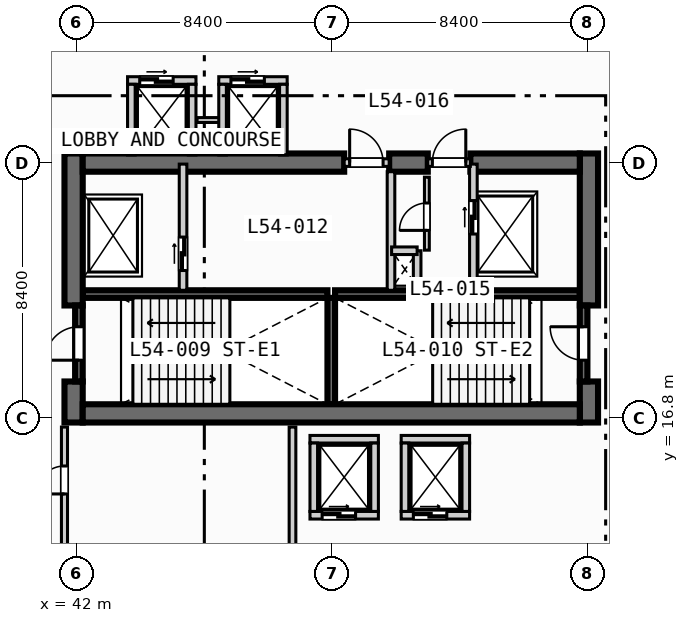
"""IFC4 building model, lengths in metres.
Left out: names, types, materials, properties, quantities, classifications, styles, units other than length and angle.
Written with IfcOpenShell. Run it as: python <this file> out.ifc"""

import sys

from ifc_helpers import new_model, si_unit, direction, frame, frame_2d, origin, place, context, subcontext, project, spatial, rectangle, extrude, element, fill, save


model = new_model("IFC4")
c1 = context("Model", 3, precision=1e-05, world=origin(), true_north=direction((0.0, 1.0)))
c2 = subcontext(c1, "Body", "Model", "MODEL_VIEW")
j1 = project(units=[si_unit("LENGTHUNIT", "METRE"), si_unit("PLANEANGLEUNIT", "RADIAN")], contexts=[c1])
p1 = place(None, origin())
s1 = spatial("IfcSite", under=j1, at=p1, CompositionType="ELEMENT")
p2 = place(p1, origin())
s2 = spatial("IfcBuilding", under=s1, at=p2, CompositionType="ELEMENT")
p3 = place(p2, frame((0.0, 0.0, 219.8)))
s3 = spatial("IfcBuildingStorey", under=s2, at=p3, CompositionType="ELEMENT", Elevation=219.8)
for number, where, z_axis, x_axis in (
    (1, (42.2, 20.875, 0.0), (0.0, 0.0, 1.0), (1.0, 0.0, 0.0)),
    (2, (50.5, 20.875, 0.0), (0.0, 0.0, 1.0), (1.0, 0.0, 0.0)),
):
    element("IfcWall", number, at=place(p3, frame(where, z_axis=z_axis, x_axis=x_axis)), inside=s3, PredefinedType="SOLIDWALL", context=c2, shape_type="SweptSolid", body=[
        extrude(rectangle(XDim=8.05, YDim=0.25, at=frame_2d((4.025, 0.0))), origin(), (0.0, 0.0, 1.0), 3.97),
    ])
p4 = place(p3, frame((50.375, 17.25, 0.0), z_axis=(0.0, 0.0, 1.0), x_axis=(0.0, 1.0, 0.0)))
e3 = element("IfcWall", 3, at=p4, inside=s3, PredefinedType="SOLIDWALL", context=c2, shape_type="SweptSolid", body=[
    extrude(rectangle(XDim=3.5, YDim=0.25, at=frame_2d((1.75, 0.0))), origin(), (0.0, 0.0, 1.0), 3.97),
])
p5 = place(p3, frame((41.9, 16.65, 0.0), z_axis=(0.0, 0.0, 1.0), x_axis=(0.0, 1.0, 0.0)))
e4 = element("IfcWall", 4, at=p5, inside=s3, PredefinedType="SHEAR", context=c2, shape_type="SweptSolid", body=[
    extrude(rectangle(XDim=1.35, YDim=0.6, at=frame_2d((0.675, 0.0))), origin(), (0.0, 0.0, 1.0), 3.97),
])
p6 = place(p3, frame((41.9, 20.5, 0.0), z_axis=(0.0, 0.0, 1.0), x_axis=(0.0, 1.0, 0.0)))
e5 = element("IfcWall", 5, at=p6, inside=s3, PredefinedType="SHEAR", context=c2, shape_type="SweptSolid", body=[
    extrude(rectangle(XDim=5.0, YDim=0.6, at=frame_2d((2.5, 0.0))), origin(), (0.0, 0.0, 1.0), 3.97),
])
p7 = place(p3, frame((58.85, 16.65, 0.0), z_axis=(0.0, 0.0, 1.0), x_axis=(0.0, 1.0, 0.0)))
e6 = element("IfcWall", 6, at=p7, inside=s3, PredefinedType="SHEAR", context=c2, shape_type="SweptSolid", body=[
    extrude(rectangle(XDim=1.35, YDim=0.6, at=frame_2d((0.675, 0.0))), origin(), (0.0, 0.0, 1.0), 3.97),
])
p8 = place(p3, frame((58.85, 20.5, 0.0), z_axis=(0.0, 0.0, 1.0), x_axis=(0.0, 1.0, 0.0)))
e7 = element("IfcWall", 7, at=p8, inside=s3, PredefinedType="SHEAR", context=c2, shape_type="SweptSolid", body=[
    extrude(rectangle(XDim=5.0, YDim=0.6, at=frame_2d((2.5, 0.0))), origin(), (0.0, 0.0, 1.0), 3.97),
])
p9 = place(p3, frame((42.2, 16.95, 0.0), z_axis=(0.0, 0.0, 1.0), x_axis=(1.0, 0.0, 0.0)))
e8 = element("IfcWall", 8, at=p9, inside=s3, PredefinedType="SHEAR", context=c2, shape_type="SweptSolid", body=[
    extrude(rectangle(XDim=16.35, YDim=0.6, at=frame_2d((8.175, 0.0))), origin(), (0.0, 0.0, 1.0), 3.97),
])
p10 = place(p3, frame((42.2, 25.2, 0.0), z_axis=(0.0, 0.0, 1.0), x_axis=(1.0, 0.0, 0.0)))
e9 = element("IfcWall", 9, at=p10, inside=s3, PredefinedType="SHEAR", context=c2, shape_type="SweptSolid", body=[
    extrude(rectangle(XDim=8.6, YDim=0.6, at=frame_2d((4.3, 0.0))), origin(), (0.0, 0.0, 1.0), 3.97),
])
p11 = place(p3, frame((52.28, 25.2, 0.0), z_axis=(0.0, 0.0, 1.0), x_axis=(1.0, 0.0, 0.0)))
e10 = element("IfcWall", 10, at=p11, inside=s3, PredefinedType="SHEAR", context=c2, shape_type="SweptSolid", body=[
    extrude(rectangle(XDim=1.27, YDim=0.6, at=frame_2d((0.635, 0.0))), origin(), (0.0, 0.0, 1.0), 3.97),
])
p12 = place(p3, frame((54.95, 25.2, 0.0), z_axis=(0.0, 0.0, 1.0), x_axis=(1.0, 0.0, 0.0)))
e11 = element("IfcWall", 11, at=p12, inside=s3, PredefinedType="SHEAR", context=c2, shape_type="SweptSolid", body=[
    extrude(rectangle(XDim=3.6, YDim=0.6, at=frame_2d((1.8, 0.0))), origin(), (0.0, 0.0, 1.0), 3.97),
])
p13 = place(p3, frame((42.075, 18.0, 0.0), z_axis=(0.0, 0.0, 1.0), x_axis=(0.0, 1.0, 0.0)))
e12 = element("IfcWall", 12, at=p13, inside=s3, PredefinedType="SOLIDWALL", context=c2, shape_type="SweptSolid", body=[
    extrude(rectangle(XDim=2.5, YDim=0.25, at=frame_2d((1.25, 0.0))), origin(), (0.0, 0.0, 1.0), 3.97),
])
p14 = place(p13, frame((0.7, 0.0, 0.0)))
e13 = element("IfcOpeningElement", 13, at=p14, cuts=e12, PredefinedType="OPENING", context=c2, shape_type="SweptSolid", body=[
    extrude(rectangle(XDim=1.1, YDim=2.15, at=frame_2d((0.55, 1.075))), frame((0.0, 0.135, 0.0), z_axis=(0.0, -1.0, 0.0), x_axis=(1.0, 0.0, 0.0)), (0.0, 0.0, 1.0), 0.27),
])
p15 = place(p3, frame((58.675, 18.0, 0.0), z_axis=(0.0, 0.0, 1.0), x_axis=(0.0, 1.0, 0.0)))
e14 = element("IfcWall", 14, at=p15, inside=s3, PredefinedType="SOLIDWALL", context=c2, shape_type="SweptSolid", body=[
    extrude(rectangle(XDim=2.5, YDim=0.25, at=frame_2d((1.25, 0.0))), origin(), (0.0, 0.0, 1.0), 3.97),
])
p16 = place(p15, frame((0.7, 0.0, 0.0)))
e15 = element("IfcOpeningElement", 15, at=p16, cuts=e14, PredefinedType="OPENING", context=c2, shape_type="SweptSolid", body=[
    extrude(rectangle(XDim=1.1, YDim=2.15, at=frame_2d((0.55, 1.075))), frame((0.0, 0.135, 0.0), z_axis=(0.0, -1.0, 0.0), x_axis=(1.0, 0.0, 0.0)), (0.0, 0.0, 1.0), 0.27),
])
p17 = place(p3, frame((45.5, 21.0, 0.0), z_axis=(0.0, 0.0, 1.0), x_axis=(0.0, 1.0, 0.0)))
e16 = element("IfcWall", 16, at=p17, inside=s3, PredefinedType="SOLIDWALL", context=c2, shape_type="SweptSolid", body=[
    extrude(rectangle(XDim=4.15, YDim=0.25, at=frame_2d((2.075, 0.0))), origin(), (0.0, 0.0, 1.0), 3.97),
])
p18 = place(p17, frame((0.65, 0.0, 0.0)))
e17 = element("IfcOpeningElement", 17, at=p18, cuts=e16, PredefinedType="OPENING", context=c2, shape_type="SweptSolid", body=[
    extrude(rectangle(XDim=1.1, YDim=2.15, at=frame_2d((0.55, 1.075))), frame((0.0, 0.135, 0.0), z_axis=(0.0, -1.0, 0.0), x_axis=(1.0, 0.0, 0.0)), (0.0, 0.0, 1.0), 0.27),
])
p19 = place(p3, frame((50.8, 25.2, 0.0), z_axis=(0.0, 0.0, 1.0), x_axis=(1.0, 0.0, 0.0)))
e18 = element("IfcWall", 18, at=p19, inside=s3, PredefinedType="SOLIDWALL", context=c2, shape_type="SweptSolid", body=[
    extrude(rectangle(XDim=1.48, YDim=0.25, at=frame_2d((0.74, 0.0))), origin(), (0.0, 0.0, 1.0), 3.97),
])
p20 = place(p19, frame((0.18, 0.0, 0.0)))
e19 = element("IfcOpeningElement", 19, at=p20, cuts=e18, PredefinedType="OPENING", context=c2, shape_type="SweptSolid", body=[
    extrude(rectangle(XDim=1.1, YDim=2.15, at=frame_2d((0.55, 1.075))), frame((0.0, 0.135, 0.0), z_axis=(0.0, -1.0, 0.0), x_axis=(1.0, 0.0, 0.0)), (0.0, 0.0, 1.0), 0.27),
])
p21 = place(p3, frame((52.34, 21.0, 0.0), z_axis=(0.0, 0.0, 1.0), x_axis=(0.0, 1.0, 0.0)))
e20 = element("IfcWall", 20, at=p21, inside=s3, PredefinedType="SOLIDWALL", context=c2, shape_type="SweptSolid", body=[
    extrude(rectangle(XDim=3.9, YDim=0.25, at=frame_2d((1.95, 0.0))), origin(), (0.0, 0.0, 1.0), 3.97),
])
p22 = place(p3, frame((55.05, 21.0, 0.0), z_axis=(0.0, 0.0, 1.0), x_axis=(0.0, 1.0, 0.0)))
e21 = element("IfcWall", 21, at=p22, inside=s3, PredefinedType="SOLIDWALL", context=c2, shape_type="SweptSolid", body=[
    extrude(rectangle(XDim=4.15, YDim=0.25, at=frame_2d((2.075, 0.0))), origin(), (0.0, 0.0, 1.0), 3.97),
])
p23 = place(p22, frame((1.85, 0.0, 0.0)))
e22 = element("IfcOpeningElement", 22, at=p23, cuts=e21, PredefinedType="OPENING", context=c2, shape_type="SweptSolid", body=[
    extrude(rectangle(XDim=1.1, YDim=2.15, at=frame_2d((0.55, 1.075))), frame((0.0, 0.135, 0.0), z_axis=(0.0, -1.0, 0.0), x_axis=(1.0, 0.0, 0.0)), (0.0, 0.0, 1.0), 0.27),
])
p24 = place(p3, frame((53.55, 25.2, 0.0), z_axis=(0.0, 0.0, 1.0), x_axis=(1.0, 0.0, 0.0)))
e23 = element("IfcWall", 23, at=p24, inside=s3, PredefinedType="SOLIDWALL", context=c2, shape_type="SweptSolid", body=[
    extrude(rectangle(XDim=1.4, YDim=0.25, at=frame_2d((0.7, 0.0))), origin(), (0.0, 0.0, 1.0), 3.97),
])
p25 = place(p24, frame((0.15, 0.0, 0.0)))
e24 = element("IfcOpeningElement", 24, at=p25, cuts=e23, PredefinedType="OPENING", context=c2, shape_type="SweptSolid", body=[
    extrude(rectangle(XDim=1.1, YDim=2.15, at=frame_2d((0.55, 1.075))), frame((0.0, 0.135, 0.0), z_axis=(0.0, -1.0, 0.0), x_axis=(1.0, 0.0, 0.0)), (0.0, 0.0, 1.0), 0.27),
])
p26 = place(p3, frame((53.2, 21.0, 0.0), z_axis=(0.0, 0.0, 1.0), x_axis=(0.0, 1.0, 0.0)))
e25 = element("IfcWall", 25, at=p26, inside=s3, PredefinedType="SOLIDWALL", context=c2, shape_type="SweptSolid", body=[
    extrude(rectangle(XDim=1.3, YDim=0.25, at=frame_2d((0.65, 0.0))), origin(), (0.0, 0.0, 1.0), 3.97),
])
p27 = place(p3, frame((52.36, 22.3, 0.0), z_axis=(0.0, 0.0, 1.0), x_axis=(1.0, 0.0, 0.0)))
e26 = element("IfcWall", 26, at=p27, inside=s3, PredefinedType="SOLIDWALL", context=c2, shape_type="SweptSolid", body=[
    extrude(rectangle(XDim=0.84, YDim=0.25, at=frame_2d((0.42, 0.0))), origin(), (0.0, 0.0, 1.0), 3.97),
])
p28 = place(p3, frame((53.52, 22.32, 0.0), z_axis=(0.0, 0.0, 1.0), x_axis=(0.0, 1.0, 0.0)))
e27 = element("IfcWall", 27, at=p28, inside=s3, PredefinedType="PARTITIONING", context=c2, shape_type="SweptSolid", body=[
    extrude(rectangle(XDim=2.4, YDim=0.16, at=frame_2d((1.2, 0.0))), origin(), (0.0, 0.0, 1.0), 3.97),
])
p29 = place(p28, frame((0.65, 0.0, 0.0)))
e28 = element("IfcOpeningElement", 28, at=p29, cuts=e27, PredefinedType="OPENING", context=c2, shape_type="SweptSolid", body=[
    extrude(rectangle(XDim=0.9, YDim=2.1, at=frame_2d((0.45, 1.05))), frame((0.0, 0.09, 0.0), z_axis=(0.0, -1.0, 0.0), x_axis=(1.0, 0.0, 0.0)), (0.0, 0.0, 1.0), 0.18),
])
p30 = place(p3, frame((49.675, 13.6, 0.0), z_axis=(0.0, 0.0, 1.0), x_axis=(1.0, 0.0, 0.0)))
e29 = element("IfcWall", 29, at=p30, inside=s3, PredefinedType="SOLIDWALL", context=c2, shape_type="SweptSolid", body=[
    extrude(rectangle(XDim=2.25, YDim=0.25, at=frame_2d((1.125, 0.0))), origin(), (0.0, 0.0, 1.0), 3.97),
])
p31 = place(p30, frame((0.4, 0.0, 0.0)))
e30 = element("IfcOpeningElement", 30, at=p31, cuts=e29, PredefinedType="OPENING", context=c2, shape_type="SweptSolid", body=[
    extrude(rectangle(XDim=1.1, YDim=2.15, at=frame_2d((0.55, 1.075))), frame((0.0, 0.135, 0.0), z_axis=(0.0, -1.0, 0.0), x_axis=(1.0, 0.0, 0.0)), (0.0, 0.0, 1.0), 0.27),
])
for number, where, z_axis, x_axis in (
    (31, (49.675, 16.1, 0.0), (0.0, 0.0, 1.0), (1.0, 0.0, 0.0)),
    (32, (49.8, 13.725, 0.0), (0.0, 0.0, 1.0), (0.0, 1.0, 0.0)),
    (33, (51.8, 13.725, 0.0), (0.0, 0.0, 1.0), (0.0, 1.0, 0.0)),
):
    element("IfcWall", number, at=place(p3, frame(where, z_axis=z_axis, x_axis=x_axis)), inside=s3, PredefinedType="SOLIDWALL", context=c2, shape_type="SweptSolid", body=[
        extrude(rectangle(XDim=2.25, YDim=0.25, at=frame_2d((1.125, 0.0))), origin(), (0.0, 0.0, 1.0), 3.97),
    ])
p32 = place(p3, frame((52.675, 13.6, 0.0), z_axis=(0.0, 0.0, 1.0), x_axis=(1.0, 0.0, 0.0)))
e34 = element("IfcWall", 34, at=p32, inside=s3, PredefinedType="SOLIDWALL", context=c2, shape_type="SweptSolid", body=[
    extrude(rectangle(XDim=2.25, YDim=0.25, at=frame_2d((1.125, 0.0))), origin(), (0.0, 0.0, 1.0), 3.97),
])
p33 = place(p32, frame((0.4, 0.0, 0.0)))
e35 = element("IfcOpeningElement", 35, at=p33, cuts=e34, PredefinedType="OPENING", context=c2, shape_type="SweptSolid", body=[
    extrude(rectangle(XDim=1.1, YDim=2.15, at=frame_2d((0.55, 1.075))), frame((0.0, 0.135, 0.0), z_axis=(0.0, -1.0, 0.0), x_axis=(1.0, 0.0, 0.0)), (0.0, 0.0, 1.0), 0.27),
])
for number, where, z_axis, x_axis in (
    (36, (52.675, 16.1, 0.0), (0.0, 0.0, 1.0), (1.0, 0.0, 0.0)),
    (37, (52.8, 13.725, 0.0), (0.0, 0.0, 1.0), (0.0, 1.0, 0.0)),
    (38, (54.8, 13.725, 0.0), (0.0, 0.0, 1.0), (0.0, 1.0, 0.0)),
):
    element("IfcWall", number, at=place(p3, frame(where, z_axis=z_axis, x_axis=x_axis)), inside=s3, PredefinedType="SOLIDWALL", context=c2, shape_type="SweptSolid", body=[
        extrude(rectangle(XDim=2.25, YDim=0.25, at=frame_2d((1.125, 0.0))), origin(), (0.0, 0.0, 1.0), 3.97),
    ])
p34 = place(p3, frame((43.675, 27.9, 0.0), z_axis=(0.0, 0.0, 1.0), x_axis=(1.0, 0.0, 0.0)))
e39 = element("IfcWall", 39, at=p34, inside=s3, PredefinedType="SOLIDWALL", context=c2, shape_type="SweptSolid", body=[
    extrude(rectangle(XDim=2.25, YDim=0.25, at=frame_2d((1.125, 0.0))), origin(), (0.0, 0.0, 1.0), 3.97),
])
p35 = place(p34, frame((0.4, 0.0, 0.0)))
e40 = element("IfcOpeningElement", 40, at=p35, cuts=e39, PredefinedType="OPENING", context=c2, shape_type="SweptSolid", body=[
    extrude(rectangle(XDim=1.1, YDim=2.15, at=frame_2d((0.55, 1.075))), frame((0.0, 0.135, 0.0), z_axis=(0.0, -1.0, 0.0), x_axis=(1.0, 0.0, 0.0)), (0.0, 0.0, 1.0), 0.27),
])
for number, where, z_axis, x_axis in (
    (41, (43.8, 25.45, 0.0), (0.0, 0.0, 1.0), (0.0, 1.0, 0.0)),
    (42, (45.8, 25.45, 0.0), (0.0, 0.0, 1.0), (0.0, 1.0, 0.0)),
):
    element("IfcWall", number, at=place(p3, frame(where, z_axis=z_axis, x_axis=x_axis)), inside=s3, PredefinedType="SOLIDWALL", context=c2, shape_type="SweptSolid", body=[
        extrude(rectangle(XDim=2.325, YDim=0.25, at=frame_2d((1.163, 0.0))), origin(), (0.0, 0.0, 1.0), 3.97),
    ])
p36 = place(p3, frame((45.96, 26.6, 0.0), z_axis=(0.0, 0.0, 1.0), x_axis=(1.0, 0.0, 0.0)))
e43 = element("IfcWall", 43, at=p36, inside=s3, PredefinedType="PARTITIONING", context=c2, shape_type="SweptSolid", body=[
    extrude(rectangle(XDim=0.88, YDim=0.16, at=frame_2d((0.44, 0.0))), origin(), (0.0, 0.0, 1.0), 3.97),
])
p37 = place(p3, frame((46.675, 27.9, 0.0), z_axis=(0.0, 0.0, 1.0), x_axis=(1.0, 0.0, 0.0)))
e44 = element("IfcWall", 44, at=p37, inside=s3, PredefinedType="SOLIDWALL", context=c2, shape_type="SweptSolid", body=[
    extrude(rectangle(XDim=2.25, YDim=0.25, at=frame_2d((1.125, 0.0))), origin(), (0.0, 0.0, 1.0), 3.97),
])
p38 = place(p37, frame((0.4, 0.0, 0.0)))
e45 = element("IfcOpeningElement", 45, at=p38, cuts=e44, PredefinedType="OPENING", context=c2, shape_type="SweptSolid", body=[
    extrude(rectangle(XDim=1.1, YDim=2.15, at=frame_2d((0.55, 1.075))), frame((0.0, 0.135, 0.0), z_axis=(0.0, -1.0, 0.0), x_axis=(1.0, 0.0, 0.0)), (0.0, 0.0, 1.0), 0.27),
])
for number, where, z_axis, x_axis in (
    (46, (46.8, 25.45, 0.0), (0.0, 0.0, 1.0), (0.0, 1.0, 0.0)),
    (47, (48.8, 25.45, 0.0), (0.0, 0.0, 1.0), (0.0, 1.0, 0.0)),
):
    element("IfcWall", number, at=place(p3, frame(where, z_axis=z_axis, x_axis=x_axis)), inside=s3, PredefinedType="SOLIDWALL", context=c2, shape_type="SweptSolid", body=[
        extrude(rectangle(XDim=2.325, YDim=0.25, at=frame_2d((1.163, 0.0))), origin(), (0.0, 0.0, 1.0), 3.97),
    ])
p39 = place(p3, frame((41.6, 0.3, 0.0), z_axis=(0.0, 0.0, 1.0), x_axis=(0.0, 1.0, 0.0)))
e48 = element("IfcWall", 48, at=p39, inside=s3, PredefinedType="PARTITIONING", context=c2, shape_type="SweptSolid", body=[
    extrude(rectangle(XDim=16.2, YDim=0.2, at=frame_2d((8.1, 0.0))), origin(), (0.0, 0.0, 1.0), 3.97),
])
p40 = place(p39, frame((14.0, 0.0, 0.0)))
e49 = element("IfcOpeningElement", 49, at=p40, cuts=e48, PredefinedType="OPENING", context=c2, shape_type="SweptSolid", body=[
    extrude(rectangle(XDim=0.92, YDim=2.1, at=frame_2d((0.46, 1.05))), frame((0.0, 0.11, 0.0), z_axis=(0.0, -1.0, 0.0), x_axis=(1.0, 0.0, 0.0)), (0.0, 0.0, 1.0), 0.22),
])
p41 = place(p3, frame((49.1, 0.3, 0.0), z_axis=(0.0, 0.0, 1.0), x_axis=(0.0, 1.0, 0.0)))
e50 = element("IfcWall", 50, at=p41, inside=s3, PredefinedType="PARTITIONING", context=c2, shape_type="SweptSolid", body=[
    extrude(rectangle(XDim=16.2, YDim=0.22, at=frame_2d((8.1, 0.0))), origin(), (0.0, 0.0, 1.0), 3.97),
])
p42 = place(p14, origin())
e51 = element("IfcDoor", 51, at=p42, inside=s3, OperationType="SINGLE_SWING_LEFT", PredefinedType="DOOR", context=c2, shape_type="SweptSolid", body=[
    extrude(rectangle(XDim=1.1, YDim=2.15, at=frame_2d((0.55, 1.075))), frame((0.0, 0.025, 0.0), z_axis=(0.0, -1.0, 0.0), x_axis=(1.0, 0.0, 0.0)), (0.0, 0.0, 1.0), 0.05),
])
fill(e13, e51)
p43 = place(p16, origin())
e52 = element("IfcDoor", 52, at=p43, inside=s3, OperationType="SINGLE_SWING_RIGHT", PredefinedType="DOOR", context=c2, shape_type="SweptSolid", body=[
    extrude(rectangle(XDim=1.1, YDim=2.15, at=frame_2d((0.55, 1.075))), frame((0.0, 0.025, 0.0), z_axis=(0.0, -1.0, 0.0), x_axis=(1.0, 0.0, 0.0)), (0.0, 0.0, 1.0), 0.05),
])
fill(e15, e52)
p44 = place(p18, origin())
e53 = element("IfcDoor", 53, at=p44, inside=s3, OperationType="SLIDING_TO_LEFT", PredefinedType="DOOR", context=c2, shape_type="SweptSolid", body=[
    extrude(rectangle(XDim=1.1, YDim=2.15, at=frame_2d((0.55, 1.075))), frame((0.0, 0.025, 0.0), z_axis=(0.0, -1.0, 0.0), x_axis=(1.0, 0.0, 0.0)), (0.0, 0.0, 1.0), 0.05),
])
fill(e17, e53)
p45 = place(p20, origin())
e54 = element("IfcDoor", 54, at=p45, inside=s3, OperationType="SINGLE_SWING_LEFT", PredefinedType="DOOR", context=c2, shape_type="SweptSolid", body=[
    extrude(rectangle(XDim=1.1, YDim=2.15, at=frame_2d((0.55, 1.075))), frame((0.0, 0.025, 0.0), z_axis=(0.0, -1.0, 0.0), x_axis=(1.0, 0.0, 0.0)), (0.0, 0.0, 1.0), 0.05),
])
fill(e19, e54)
p46 = place(p23, origin())
e55 = element("IfcDoor", 55, at=p46, inside=s3, OperationType="SLIDING_TO_LEFT", PredefinedType="DOOR", context=c2, shape_type="SweptSolid", body=[
    extrude(rectangle(XDim=1.1, YDim=2.15, at=frame_2d((0.55, 1.075))), frame((0.0, 0.025, 0.0), z_axis=(0.0, -1.0, 0.0), x_axis=(1.0, 0.0, 0.0)), (0.0, 0.0, 1.0), 0.05),
])
fill(e22, e55)
p47 = place(p25, origin())
e56 = element("IfcDoor", 56, at=p47, inside=s3, OperationType="SINGLE_SWING_RIGHT", PredefinedType="DOOR", context=c2, shape_type="SweptSolid", body=[
    extrude(rectangle(XDim=1.1, YDim=2.15, at=frame_2d((0.55, 1.075))), frame((0.0, 0.025, 0.0), z_axis=(0.0, -1.0, 0.0), x_axis=(1.0, 0.0, 0.0)), (0.0, 0.0, 1.0), 0.05),
])
fill(e24, e56)
p48 = place(p29, origin())
e57 = element("IfcDoor", 57, at=p48, inside=s3, OperationType="SINGLE_SWING_LEFT", PredefinedType="DOOR", context=c2, shape_type="SweptSolid", body=[
    extrude(rectangle(XDim=0.9, YDim=2.1, at=frame_2d((0.45, 1.05))), frame((0.0, 0.025, 0.0), z_axis=(0.0, -1.0, 0.0), x_axis=(1.0, 0.0, 0.0)), (0.0, 0.0, 1.0), 0.05),
])
fill(e28, e57)
p49 = place(p31, origin())
e58 = element("IfcDoor", 58, at=p49, inside=s3, OperationType="SLIDING_TO_LEFT", PredefinedType="DOOR", context=c2, shape_type="SweptSolid", body=[
    extrude(rectangle(XDim=1.1, YDim=2.15, at=frame_2d((0.55, 1.075))), frame((0.0, 0.025, 0.0), z_axis=(0.0, -1.0, 0.0), x_axis=(1.0, 0.0, 0.0)), (0.0, 0.0, 1.0), 0.05),
])
fill(e30, e58)
p50 = place(p33, origin())
e59 = element("IfcDoor", 59, at=p50, inside=s3, OperationType="SLIDING_TO_LEFT", PredefinedType="DOOR", context=c2, shape_type="SweptSolid", body=[
    extrude(rectangle(XDim=1.1, YDim=2.15, at=frame_2d((0.55, 1.075))), frame((0.0, 0.025, 0.0), z_axis=(0.0, -1.0, 0.0), x_axis=(1.0, 0.0, 0.0)), (0.0, 0.0, 1.0), 0.05),
])
fill(e35, e59)
p51 = place(p35, origin())
e60 = element("IfcDoor", 60, at=p51, inside=s3, OperationType="SLIDING_TO_LEFT", PredefinedType="DOOR", context=c2, shape_type="SweptSolid", body=[
    extrude(rectangle(XDim=1.1, YDim=2.15, at=frame_2d((0.55, 1.075))), frame((0.0, 0.025, 0.0), z_axis=(0.0, -1.0, 0.0), x_axis=(1.0, 0.0, 0.0)), (0.0, 0.0, 1.0), 0.05),
])
fill(e40, e60)
p52 = place(p38, origin())
e61 = element("IfcDoor", 61, at=p52, inside=s3, OperationType="SLIDING_TO_LEFT", PredefinedType="DOOR", context=c2, shape_type="SweptSolid", body=[
    extrude(rectangle(XDim=1.1, YDim=2.15, at=frame_2d((0.55, 1.075))), frame((0.0, 0.025, 0.0), z_axis=(0.0, -1.0, 0.0), x_axis=(1.0, 0.0, 0.0)), (0.0, 0.0, 1.0), 0.05),
])
fill(e45, e61)
p53 = place(p40, origin())
e62 = element("IfcDoor", 62, at=p53, inside=s3, OperationType="SINGLE_SWING_LEFT", PredefinedType="DOOR", context=c2, shape_type="SweptSolid", body=[
    extrude(rectangle(XDim=0.92, YDim=2.1, at=frame_2d((0.46, 1.05))), frame((0.0, 0.025, 0.0), z_axis=(0.0, -1.0, 0.0), x_axis=(1.0, 0.0, 0.0)), (0.0, 0.0, 1.0), 0.05),
])
fill(e49, e62)
save(model, sys.argv[1])
